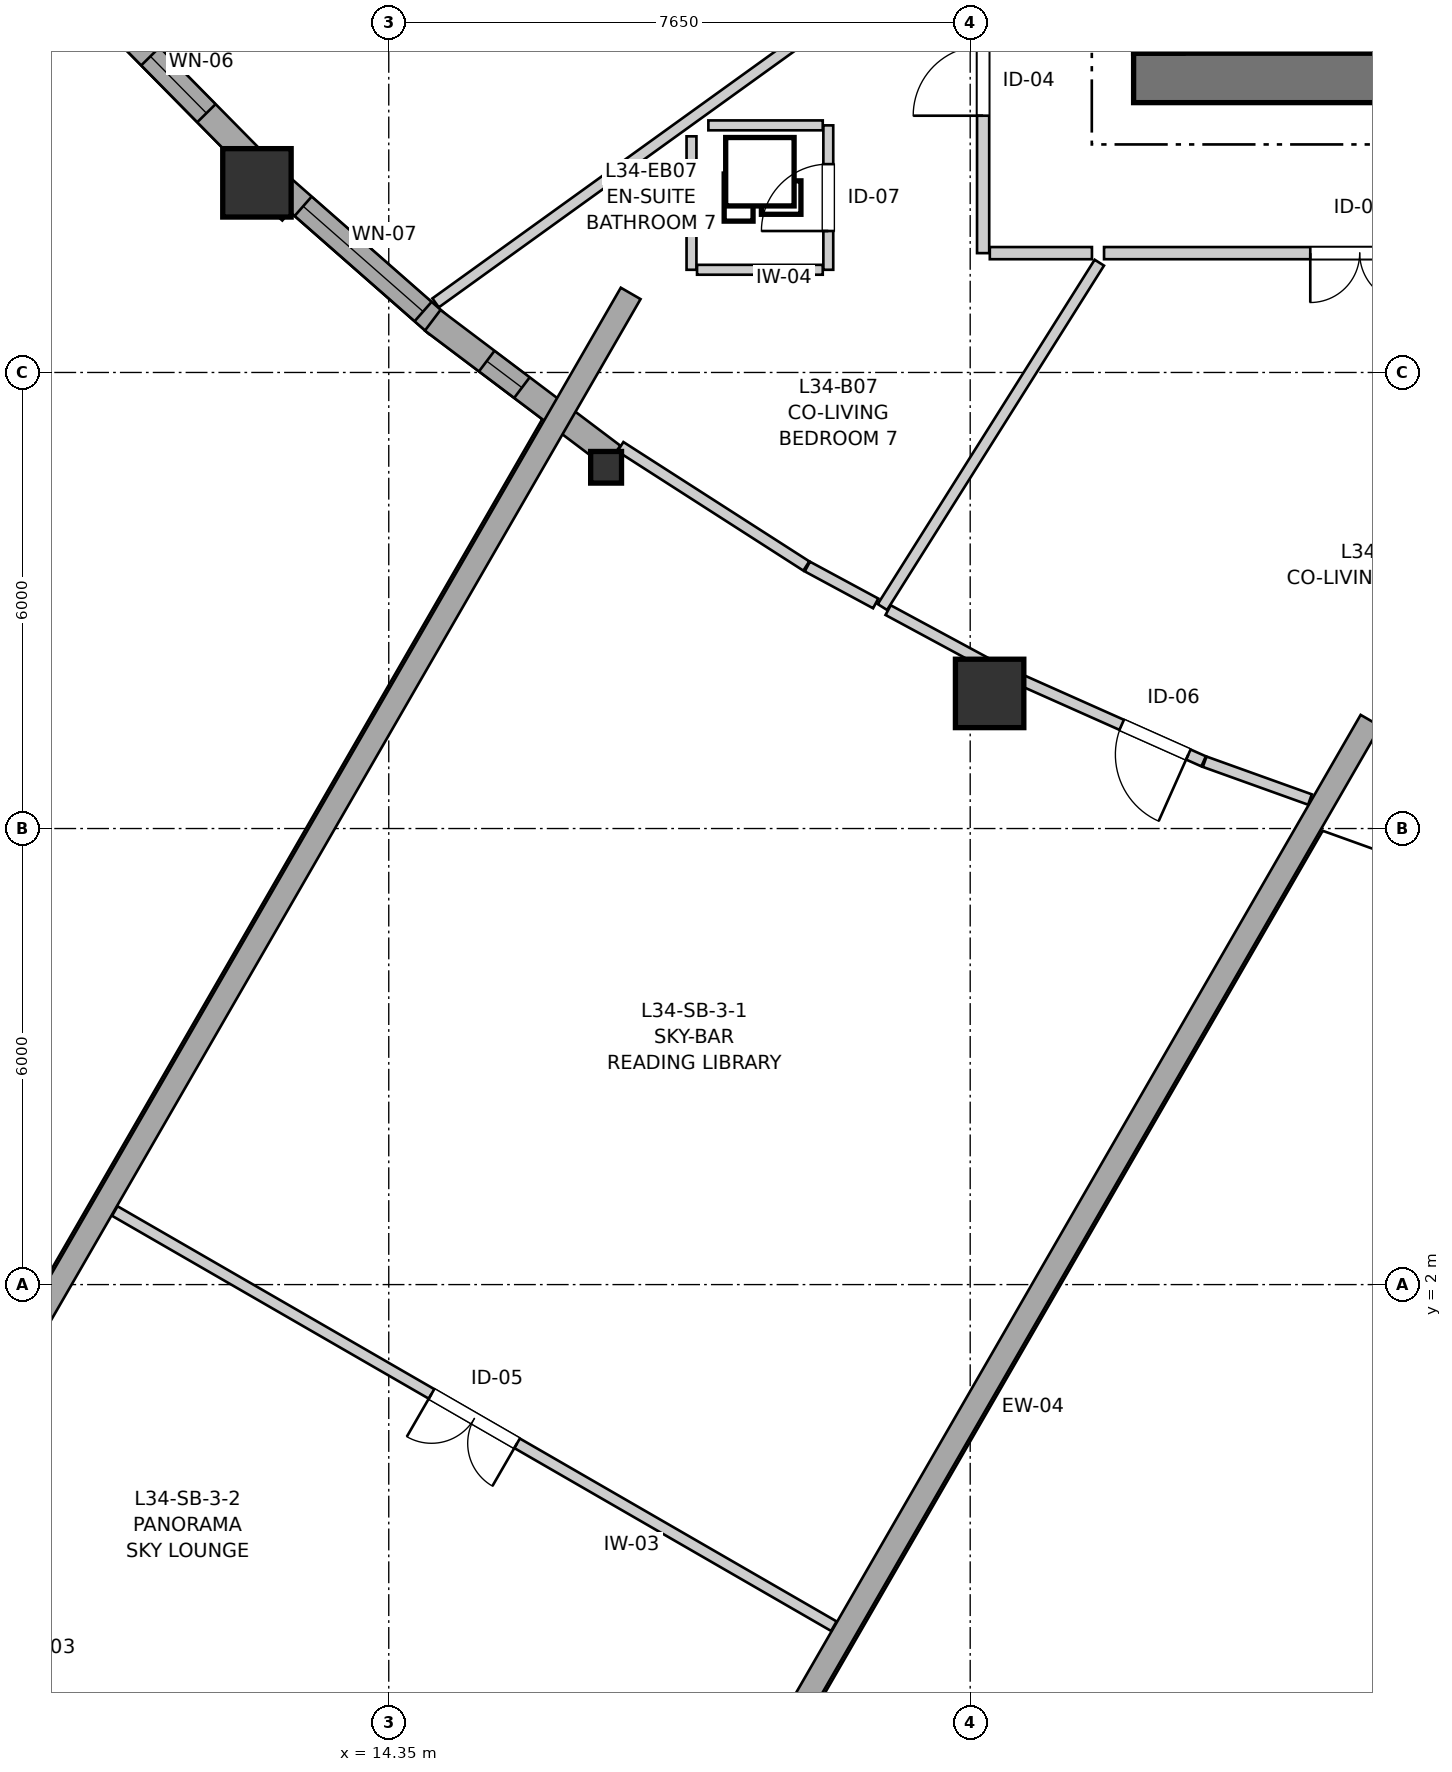
"""IFC4 building model, lengths in metres.
Left out: names, types, materials, properties, quantities, classifications, styles, units other than length and angle.
Written with IfcOpenShell. Run it as: python <this file> out.ifc"""

import sys

from ifc_helpers import new_model, si_unit, direction, frame, frame_2d, origin, origin_2d, place, context, subcontext, project, spatial, rectangle, i_section, extrude, source, transform, mapped, element, fill, save


model = new_model("IFC4")
c1 = context("Model", 3, precision=1e-05, world=origin(), true_north=direction((0.0, 1.0)))
c2 = subcontext(c1, "Body", "Model", "MODEL_VIEW")
j1 = project(units=[si_unit("LENGTHUNIT", "METRE"), si_unit("PLANEANGLEUNIT", "RADIAN")], contexts=[c1])
p1 = place(None, origin())
s1 = spatial("IfcSite", under=j1, at=p1, CompositionType="ELEMENT")
p2 = place(p1, origin())
s2 = spatial("IfcBuilding", under=s1, at=p2, CompositionType="ELEMENT")
p3 = place(p2, frame((0.0, 0.0, 115.2)))
s3 = spatial("IfcBuildingStorey", under=s2, at=p3, CompositionType="ELEMENT", Elevation=115.2)
p4 = place(p3, frame((24.15, 17.875, 0.0), z_axis=(0.0, 0.0, 1.0), x_axis=(1.0, 0.0, 0.0)))
e1 = element("IfcWall", 1, at=p4, inside=s3, PredefinedType="SHEAR", context=c2, shape_type="SweptSolid", body=[
    extrude(rectangle(XDim=12.4, YDim=0.65, at=frame_2d((6.2, 0.0))), origin(), (0.0, 0.0, 1.0), 2.95),
])
p5 = place(p3, frame((24.475, 33.8, 0.0), z_axis=(0.0, 0.0, 1.0), x_axis=(0.0, -1.0, 0.0)))
e2 = element("IfcWall", 2, at=p5, inside=s3, PredefinedType="SHEAR", context=c2, shape_type="SweptSolid", body=[
    extrude(rectangle(XDim=15.6, YDim=0.65, at=frame_2d((7.8, 0.0))), origin(), (0.0, 0.0, 1.0), 2.95),
])
p6 = place(p5, frame((7.05, 0.0, 0.0)))
e3 = element("IfcOpeningElement", 3, at=p6, cuts=e2, PredefinedType="OPENING", context=c2, shape_type="SweptSolid", body=[
    extrude(rectangle(XDim=1.5, YDim=2.15, at=frame_2d((0.75, 1.075))), frame((0.0, 0.335, 0.0), z_axis=(0.0, -1.0, 0.0), x_axis=(1.0, 0.0, 0.0)), (0.0, 0.0, 1.0), 0.67),
])
p7 = place(p5, frame((3.52, 0.0, 0.0)))
e4 = element("IfcOpeningElement", 4, at=p7, cuts=e2, PredefinedType="OPENING", context=c2, shape_type="SweptSolid", body=[
    extrude(rectangle(XDim=0.86, YDim=2.05, at=frame_2d((0.43, 1.025))), frame((0.0, 0.335, 0.0), z_axis=(0.0, -1.0, 0.0), x_axis=(1.0, 0.0, 0.0)), (0.0, 0.0, 1.0), 0.67),
])
p8 = place(p5, frame((11.22, 0.0, 0.0)))
e5 = element("IfcOpeningElement", 5, at=p8, cuts=e2, PredefinedType="OPENING", context=c2, shape_type="SweptSolid", body=[
    extrude(rectangle(XDim=0.86, YDim=2.05, at=frame_2d((0.43, 1.025))), frame((0.0, 0.335, 0.0), z_axis=(0.0, -1.0, 0.0), x_axis=(1.0, 0.0, 0.0)), (0.0, 0.0, 1.0), 0.67),
])
m1 = source(origin(), c2, "Body", "SweptSolid", [
    extrude(rectangle(XDim=0.9, YDim=0.9, at=origin_2d()), origin(), (0.0, 0.0, 1.0), 2.95),
])
p9 = place(p3, frame((12.616, 16.495, 0.0), z_axis=(0.0, 0.0, 1.0), x_axis=(1.0, 0.0, 0.0)))
e6 = element("IfcColumn", 6, at=p9, inside=s3, PredefinedType="COLUMN", context=c2, shape_type="MappedRepresentation", body=[
    mapped(m1, transform((0.0, 0.0, 0.0), x_axis=(1.0, 0.0, 0.0), y_axis=(0.0, 1.0, 0.0), z_axis=(0.0, 0.0, 1.0), scale=1.0)),
])
m2 = source(origin(), c2, "Body", "SweptSolid", [
    extrude(i_section(OverallWidth=0.406, OverallDepth=0.416, WebThickness=0.027, FlangeThickness=0.044, FilletRadius=0.015, at=origin_2d()), origin(), (0.0, 0.0, 1.0), 2.95),
])
p10 = place(p3, frame((17.209, 12.753, 0.0), z_axis=(0.0, 0.0, 1.0), x_axis=(1.0, 0.0, 0.0)))
e7 = element("IfcColumn", 7, at=p10, inside=s3, PredefinedType="PILASTER", context=c2, shape_type="MappedRepresentation", body=[
    mapped(m2, transform((0.0, 0.0, 0.0), x_axis=(1.0, 0.0, 0.0), y_axis=(0.0, 1.0, 0.0), z_axis=(0.0, 0.0, 1.0), scale=1.0)),
])
p11 = place(p3, frame((22.256, 9.778, 0.0), z_axis=(0.0, 0.0, 1.0), x_axis=(1.0, 0.0, 0.0)))
e8 = element("IfcColumn", 8, at=p11, inside=s3, PredefinedType="COLUMN", context=c2, shape_type="MappedRepresentation", body=[
    mapped(m1, transform((0.0, 0.0, 0.0), x_axis=(1.0, 0.0, 0.0), y_axis=(0.0, 1.0, 0.0), z_axis=(0.0, 0.0, 1.0), scale=1.0)),
])
p12 = place(p3, frame((10.583, 18.8, 0.0), z_axis=(0.0, 0.0, 1.0), x_axis=(0.701884352283, -0.712290920917, 0.0)))
e9 = element("IfcWall", 9, at=p12, inside=s3, PredefinedType="SOLIDWALL", context=c2, shape_type="SweptSolid", body=[
    extrude(rectangle(XDim=2.839, YDim=0.34, at=frame_2d((1.419, 0.0))), origin(), (0.0, 0.0, 1.0), 2.48),
])
p13 = place(p12, frame((0.899, 0.0, 0.82)))
e10 = element("IfcOpeningElement", 10, at=p13, cuts=e9, PredefinedType="OPENING", context=c2, shape_type="SweptSolid", body=[
    extrude(rectangle(XDim=1.05, YDim=1.45, at=frame_2d((0.525, 0.725))), frame((0.0, 0.18, 0.0), z_axis=(0.0, -1.0, 0.0), x_axis=(1.0, 0.0, 0.0)), (0.0, 0.0, 1.0), 0.36),
])
p14 = place(p3, frame((12.901, 16.471, 0.0), z_axis=(0.0, 0.0, 1.0), x_axis=(0.751480442913, -0.659755366722, 0.0)))
e11 = element("IfcWall", 11, at=p14, inside=s3, PredefinedType="SOLIDWALL", context=c2, shape_type="SweptSolid", body=[
    extrude(rectangle(XDim=2.789, YDim=0.34, at=frame_2d((1.395, 0.0))), origin(), (0.0, 0.0, 1.0), 2.48),
])
p15 = place(p14, frame((0.43, 0.0, 0.82)))
e12 = element("IfcOpeningElement", 12, at=p15, cuts=e11, PredefinedType="OPENING", context=c2, shape_type="SweptSolid", body=[
    extrude(rectangle(XDim=2.1, YDim=1.4, at=frame_2d((1.05, 0.7))), frame((0.0, 0.18, 0.0), z_axis=(0.0, -1.0, 0.0), x_axis=(1.0, 0.0, 0.0)), (0.0, 0.0, 1.0), 0.36),
])
p16 = place(p3, frame((14.928, 14.686, 0.0), z_axis=(0.0, 0.0, 1.0), x_axis=(0.798387010211, -0.602144651995, 0.0)))
e13 = element("IfcWall", 13, at=p16, inside=s3, PredefinedType="SOLIDWALL", context=c2, shape_type="SweptSolid", body=[
    extrude(rectangle(XDim=2.966, YDim=0.34, at=frame_2d((1.483, 0.0))), origin(), (0.0, 0.0, 1.0), 2.48),
])
p17 = place(p16, frame((0.891, 0.0, 0.82)))
e14 = element("IfcOpeningElement", 14, at=p17, cuts=e13, PredefinedType="OPENING", context=c2, shape_type="SweptSolid", body=[
    extrude(rectangle(XDim=0.58, YDim=1.35, at=frame_2d((0.29, 0.675))), frame((0.0, 0.18, 0.0), z_axis=(0.0, -1.0, 0.0), x_axis=(1.0, 0.0, 0.0)), (0.0, 0.0, 1.0), 0.36),
])
p18 = place(p3, frame((27.267, 9.42, 0.0), z_axis=(0.0, 0.0, 1.0), x_axis=(-0.500001212782, -0.866024703583, 0.0)))
e15 = element("IfcWall", 15, at=p18, inside=s3, PredefinedType="SOLIDWALL", context=c2, shape_type="SweptSolid", body=[
    extrude(rectangle(XDim=20.09, YDim=0.3, at=frame_2d((10.045, 0.0))), origin(), (0.0, 0.0, 1.0), 2.13),
])
p19 = place(p3, frame((17.533, 15.04, 0.0), z_axis=(0.0, 0.0, 1.0), x_axis=(-0.499995950774, -0.866027741594, 0.0)))
e16 = element("IfcWall", 16, at=p19, inside=s3, PredefinedType="SOLIDWALL", context=c2, shape_type="SweptSolid", body=[
    extrude(rectangle(XDim=20.091, YDim=0.3, at=frame_2d((10.045, 0.0))), origin(), (0.0, 0.0, 1.0), 2.13),
])
p20 = place(p3, frame((20.206, -2.494, 0.0), z_axis=(0.0, 0.0, 1.0), x_axis=(-0.866034115916, 0.499984909842, 0.0)))
e17 = element("IfcWall", 17, at=p20, inside=s3, PredefinedType="PARTITIONING", context=c2, shape_type="SweptSolid", body=[
    extrude(rectangle(XDim=10.924, YDim=0.145, at=frame_2d((5.462, 0.0))), origin(), (0.0, 0.0, 1.0), 2.383),
])
p21 = place(p20, frame((4.812, 0.0, 0.0)))
e18 = element("IfcOpeningElement", 18, at=p21, cuts=e17, PredefinedType="OPENING", context=c2, shape_type="SweptSolid", body=[
    extrude(rectangle(XDim=1.3, YDim=2.1, at=frame_2d((0.65, 1.05))), frame((0.0, 0.083, 0.0), z_axis=(0.0, -1.0, 0.0), x_axis=(1.0, 0.0, 0.0)), (0.0, 0.0, 1.0), 0.165),
])
p22 = place(p3, frame((30.486, 15.57, 0.0), z_axis=(0.0, 0.0, 1.0), x_axis=(-1.0, 0.0, 0.0)))
e19 = element("IfcWall", 19, at=p22, inside=s3, PredefinedType="PARTITIONING", context=c2, shape_type="SweptSolid", body=[
    extrude(rectangle(XDim=6.725, YDim=0.16, at=frame_2d((3.363, 0.0))), origin(), (0.0, 0.0, 1.0), 2.95),
])
p23 = place(p22, frame((2.711, 0.0, 0.0)))
e20 = element("IfcOpeningElement", 20, at=p23, cuts=e19, PredefinedType="OPENING", context=c2, shape_type="SweptSolid", body=[
    extrude(rectangle(XDim=1.3, YDim=2.1, at=frame_2d((0.65, 1.05))), frame((0.0, 0.09, 0.0), z_axis=(0.0, -1.0, 0.0), x_axis=(1.0, 0.0, 0.0)), (0.0, 0.0, 1.0), 0.18),
])
p24 = place(p3, frame((22.17, 15.57, 0.0), z_axis=(0.0, 0.0, 1.0), x_axis=(0.0, 1.0, 0.0)))
e21 = element("IfcWall", 21, at=p24, inside=s3, PredefinedType="PARTITIONING", context=c2, shape_type="SweptSolid", body=[
    extrude(rectangle(XDim=4.555, YDim=0.16, at=frame_2d((2.277, 0.0))), origin(), (0.0, 0.0, 1.0), 2.95),
])
p25 = place(p24, frame((1.808, 0.0, 0.0)))
e22 = element("IfcOpeningElement", 22, at=p25, cuts=e21, PredefinedType="OPENING", context=c2, shape_type="SweptSolid", body=[
    extrude(rectangle(XDim=0.92, YDim=2.1, at=frame_2d((0.46, 1.05))), frame((0.0, 0.09, 0.0), z_axis=(0.0, -1.0, 0.0), x_axis=(1.0, 0.0, 0.0)), (0.0, 0.0, 1.0), 0.18),
])
p26 = place(p3, frame((25.071, 8.884, 0.0), z_axis=(0.0, 0.0, 1.0), x_axis=(-0.913404708383, 0.407052623997, 0.0)))
e23 = element("IfcWall", 23, at=p26, inside=s3, PredefinedType="PARTITIONING", context=c2, shape_type="SweptSolid", body=[
    extrude(rectangle(XDim=2.923, YDim=0.145, at=frame_2d((1.462, 0.0))), origin(), (0.0, 0.0, 1.0), 2.468),
])
p27 = place(p26, frame((0.22, 0.0, 0.0)))
e24 = element("IfcOpeningElement", 24, at=p27, cuts=e23, PredefinedType="OPENING", context=c2, shape_type="SweptSolid", body=[
    extrude(rectangle(XDim=0.96, YDim=2.1, at=frame_2d((0.48, 1.05))), frame((0.0, 0.083, 0.0), z_axis=(0.0, -1.0, 0.0), x_axis=(1.0, 0.0, 0.0)), (0.0, 0.0, 1.0), 0.165),
])
p28 = place(p3, frame((20.133, 15.351, 0.0), z_axis=(0.0, 0.0, 1.0), x_axis=(0.0, 1.0, 0.0)))
e25 = element("IfcWall", 25, at=p28, inside=s3, PredefinedType="PARTITIONING", context=c2, shape_type="SweptSolid", body=[
    extrude(rectangle(XDim=1.9, YDim=0.13, at=frame_2d((0.95, 0.0))), origin(), (0.0, 0.0, 1.0), 2.95),
])
p29 = place(p28, frame((0.51, 0.0, 0.0)))
e26 = element("IfcOpeningElement", 26, at=p29, cuts=e25, PredefinedType="OPENING", context=c2, shape_type="SweptSolid", body=[
    extrude(rectangle(XDim=0.88, YDim=2.05, at=frame_2d((0.44, 1.025))), frame((0.0, 0.075, 0.0), z_axis=(0.0, -1.0, 0.0), x_axis=(1.0, 0.0, 0.0)), (0.0, 0.0, 1.0), 0.15),
])
p30 = place(p3, frame((14.966, 14.915, 0.0), z_axis=(0.0, 0.0, 1.0), x_axis=(0.811310715309, 0.584615192434, 0.0)))
e27 = element("IfcWall", 27, at=p30, inside=s3, PredefinedType="PARTITIONING", context=c2, shape_type="SweptSolid", body=[
    extrude(rectangle(XDim=8.72, YDim=0.145, at=frame_2d((4.36, 0.0))), origin(), (0.0, 0.0, 1.0), 2.118),
])
p31 = place(p3, frame((20.845, 10.914, 0.0), z_axis=(0.0, 0.0, 1.0), x_axis=(0.533007953382, 0.846110230189, 0.0)))
e28 = element("IfcWall", 28, at=p31, inside=s3, PredefinedType="PARTITIONING", context=c2, shape_type="SweptSolid", body=[
    extrude(rectangle(XDim=5.354, YDim=0.145, at=frame_2d((2.677, 0.0))), origin(), (0.0, 0.0, 1.0), 2.95),
])
p32 = place(p3, frame((17.398, 13.024, 0.0), z_axis=(0.0, 0.0, 1.0), x_axis=(0.841590343852, -0.540116369994, 0.0)))
e29 = element("IfcWall", 29, at=p32, inside=s3, PredefinedType="PARTITIONING", context=c2, shape_type="SweptSolid", body=[
    extrude(rectangle(XDim=2.906, YDim=0.145, at=frame_2d((1.453, 0.0))), origin(), (0.0, 0.0, 1.0), 2.468),
])
p33 = place(p3, frame((18.333, 15.351, 0.0), z_axis=(0.0, 0.0, 1.0), x_axis=(0.0, 1.0, 0.0)))
e30 = element("IfcWall", 30, at=p33, inside=s3, PredefinedType="PARTITIONING", context=c2, shape_type="SweptSolid", body=[
    extrude(rectangle(XDim=1.756, YDim=0.13, at=frame_2d((0.878, 0.0))), origin(), (0.0, 0.0, 1.0), 2.95),
])
p34 = place(p3, frame((18.555, 17.251, 0.0), z_axis=(0.0, 0.0, 1.0), x_axis=(1.0, 0.0, 0.0)))
e31 = element("IfcWall", 31, at=p34, inside=s3, PredefinedType="PARTITIONING", context=c2, shape_type="SweptSolid", body=[
    extrude(rectangle(XDim=1.505, YDim=0.13, at=frame_2d((0.752, 0.0))), origin(), (0.0, 0.0, 1.0), 2.95),
])
p35 = place(p3, frame((18.406, 15.351, 0.0), z_axis=(0.0, 0.0, 1.0), x_axis=(1.0, 0.0, 0.0)))
e32 = element("IfcWall", 32, at=p35, inside=s3, PredefinedType="PARTITIONING", context=c2, shape_type="SweptSolid", body=[
    extrude(rectangle(XDim=1.654, YDim=0.13, at=frame_2d((0.827, 0.0))), origin(), (0.0, 0.0, 1.0), 2.95),
])
p36 = place(p3, frame((20.92, 10.873, 0.0), z_axis=(0.0, 0.0, 1.0), x_axis=(0.879929881444, -0.475103571595, 0.0)))
e33 = element("IfcWall", 33, at=p36, inside=s3, PredefinedType="PARTITIONING", context=c2, shape_type="SweptSolid", body=[
    extrude(rectangle(XDim=1.667, YDim=0.145, at=frame_2d((0.834, 0.0))), origin(), (0.0, 0.0, 1.0), 2.468),
])
p37 = place(p3, frame((22.258, 15.57, 0.0), z_axis=(0.0, 0.0, 1.0), x_axis=(1.0, 0.0, 0.0)))
e34 = element("IfcWall", 34, at=p37, inside=s3, PredefinedType="PARTITIONING", context=c2, shape_type="SweptSolid", body=[
    extrude(rectangle(XDim=1.344, YDim=0.16, at=frame_2d((0.672, 0.0))), origin(), (0.0, 0.0, 1.0), 2.95),
])
p38 = place(p3, frame((25.085, 8.879, 0.0), z_axis=(0.0, 0.0, 1.0), x_axis=(0.941166260093, -0.337943887151, 0.0)))
e35 = element("IfcWall", 35, at=p38, inside=s3, PredefinedType="PARTITIONING", context=c2, shape_type="SweptSolid", body=[
    extrude(rectangle(XDim=1.472, YDim=0.145, at=frame_2d((0.736, 0.0))), origin(), (0.0, 0.0, 1.0), 2.468),
])
p39 = place(p3, frame((19.857, 11.447, 0.0), z_axis=(0.0, 0.0, 1.0), x_axis=(0.8800411893, -0.474897362738, 0.0)))
e36 = element("IfcWall", 36, at=p39, inside=s3, PredefinedType="PARTITIONING", context=c2, shape_type="SweptSolid", body=[
    extrude(rectangle(XDim=1.022, YDim=0.145, at=frame_2d((0.511, 0.0))), origin(), (0.0, 0.0, 1.0), 2.468),
])
m3 = source(origin(), c2, "Body", "SweptSolid", [
    extrude(rectangle(XDim=1.05, YDim=1.45, at=frame_2d((0.525, 0.725))), frame((0.0, 0.03, 0.0), z_axis=(0.0, -1.0, 0.0), x_axis=(1.0, 0.0, 0.0)), (0.0, 0.0, 1.0), 0.06),
])
p40 = place(p13, origin())
e37 = element("IfcWindow", 37, at=p40, inside=s3, PartitioningType="SINGLE_PANEL", PredefinedType="WINDOW", context=c2, shape_type="MappedRepresentation", body=[
    mapped(m3, transform((0.0, 0.0, 0.0), x_axis=(1.0, 0.0, 0.0), y_axis=(0.0, 1.0, 0.0), z_axis=(0.0, 0.0, 1.0), scale=1.0)),
])
fill(e10, e37)
m4 = source(origin(), c2, "Body", "SweptSolid", [
    extrude(rectangle(XDim=2.1, YDim=1.4, at=frame_2d((1.05, 0.7))), frame((0.0, 0.03, 0.0), z_axis=(0.0, -1.0, 0.0), x_axis=(1.0, 0.0, 0.0)), (0.0, 0.0, 1.0), 0.06),
])
p41 = place(p15, origin())
e38 = element("IfcWindow", 38, at=p41, inside=s3, PartitioningType="SINGLE_PANEL", PredefinedType="WINDOW", context=c2, shape_type="MappedRepresentation", body=[
    mapped(m4, transform((0.0, 0.0, 0.0), x_axis=(1.0, 0.0, 0.0), y_axis=(0.0, 1.0, 0.0), z_axis=(0.0, 0.0, 1.0), scale=1.0)),
])
fill(e12, e38)
m5 = source(origin(), c2, "Body", "SweptSolid", [
    extrude(rectangle(XDim=0.58, YDim=1.35, at=frame_2d((0.29, 0.675))), frame((0.0, 0.03, 0.0), z_axis=(0.0, -1.0, 0.0), x_axis=(1.0, 0.0, 0.0)), (0.0, 0.0, 1.0), 0.06),
])
p42 = place(p17, origin())
e39 = element("IfcWindow", 39, at=p42, inside=s3, PartitioningType="SINGLE_PANEL", PredefinedType="WINDOW", context=c2, shape_type="MappedRepresentation", body=[
    mapped(m5, transform((0.0, 0.0, 0.0), x_axis=(1.0, 0.0, 0.0), y_axis=(0.0, 1.0, 0.0), z_axis=(0.0, 0.0, 1.0), scale=1.0)),
])
fill(e14, e39)
m6 = source(origin(), c2, "Body", "SweptSolid", [
    extrude(rectangle(XDim=1.3, YDim=2.1, at=frame_2d((0.65, 1.05))), frame((0.0, 0.025, 0.0), z_axis=(0.0, -1.0, 0.0), x_axis=(1.0, 0.0, 0.0)), (0.0, 0.0, 1.0), 0.05),
])
p43 = place(p21, origin())
e40 = element("IfcDoor", 40, at=p43, inside=s3, OperationType="DOUBLE_DOOR_SINGLE_SWING", PredefinedType="DOOR", context=c2, shape_type="MappedRepresentation", body=[
    mapped(m6, transform((0.0, 0.0, 0.0), x_axis=(1.0, 0.0, 0.0), y_axis=(0.0, 1.0, 0.0), z_axis=(0.0, 0.0, 1.0), scale=1.0)),
])
fill(e18, e40)
p44 = place(p23, origin())
e41 = element("IfcDoor", 41, at=p44, inside=s3, OperationType="DOUBLE_DOOR_SINGLE_SWING", PredefinedType="DOOR", context=c2, shape_type="MappedRepresentation", body=[
    mapped(m6, transform((0.0, 0.0, 0.0), x_axis=(1.0, 0.0, 0.0), y_axis=(0.0, 1.0, 0.0), z_axis=(0.0, 0.0, 1.0), scale=1.0)),
])
fill(e20, e41)
m7 = source(origin(), c2, "Body", "SweptSolid", [
    extrude(rectangle(XDim=0.92, YDim=2.1, at=frame_2d((0.46, 1.05))), frame((0.0, 0.025, 0.0), z_axis=(0.0, -1.0, 0.0), x_axis=(1.0, 0.0, 0.0)), (0.0, 0.0, 1.0), 0.05),
])
p45 = place(p25, origin())
e42 = element("IfcDoor", 42, at=p45, inside=s3, OperationType="SINGLE_SWING_LEFT", PredefinedType="DOOR", context=c2, shape_type="MappedRepresentation", body=[
    mapped(m7, transform((0.0, 0.0, 0.0), x_axis=(1.0, 0.0, 0.0), y_axis=(0.0, 1.0, 0.0), z_axis=(0.0, 0.0, 1.0), scale=1.0)),
])
fill(e22, e42)
m8 = source(origin(), c2, "Body", "SweptSolid", [
    extrude(rectangle(XDim=0.96, YDim=2.1, at=frame_2d((0.48, 1.05))), frame((0.0, 0.025, 0.0), z_axis=(0.0, -1.0, 0.0), x_axis=(1.0, 0.0, 0.0)), (0.0, 0.0, 1.0), 0.05),
])
p46 = place(p27, origin())
e43 = element("IfcDoor", 43, at=p46, inside=s3, OperationType="SINGLE_SWING_LEFT", PredefinedType="DOOR", context=c2, shape_type="MappedRepresentation", body=[
    mapped(m8, transform((0.0, 0.0, 0.0), x_axis=(1.0, 0.0, 0.0), y_axis=(0.0, 1.0, 0.0), z_axis=(0.0, 0.0, 1.0), scale=1.0)),
])
fill(e24, e43)
m9 = source(origin(), c2, "Body", "SweptSolid", [
    extrude(rectangle(XDim=0.88, YDim=2.05, at=frame_2d((0.44, 1.025))), frame((0.0, 0.025, 0.0), z_axis=(0.0, -1.0, 0.0), x_axis=(1.0, 0.0, 0.0)), (0.0, 0.0, 1.0), 0.05),
])
p47 = place(p29, origin())
e44 = element("IfcDoor", 44, at=p47, inside=s3, OperationType="SINGLE_SWING_LEFT", PredefinedType="DOOR", context=c2, shape_type="MappedRepresentation", body=[
    mapped(m9, transform((0.0, 0.0, 0.0), x_axis=(1.0, 0.0, 0.0), y_axis=(0.0, 1.0, 0.0), z_axis=(0.0, 0.0, 1.0), scale=1.0)),
])
fill(e26, e44)
save(model, sys.argv[1])
